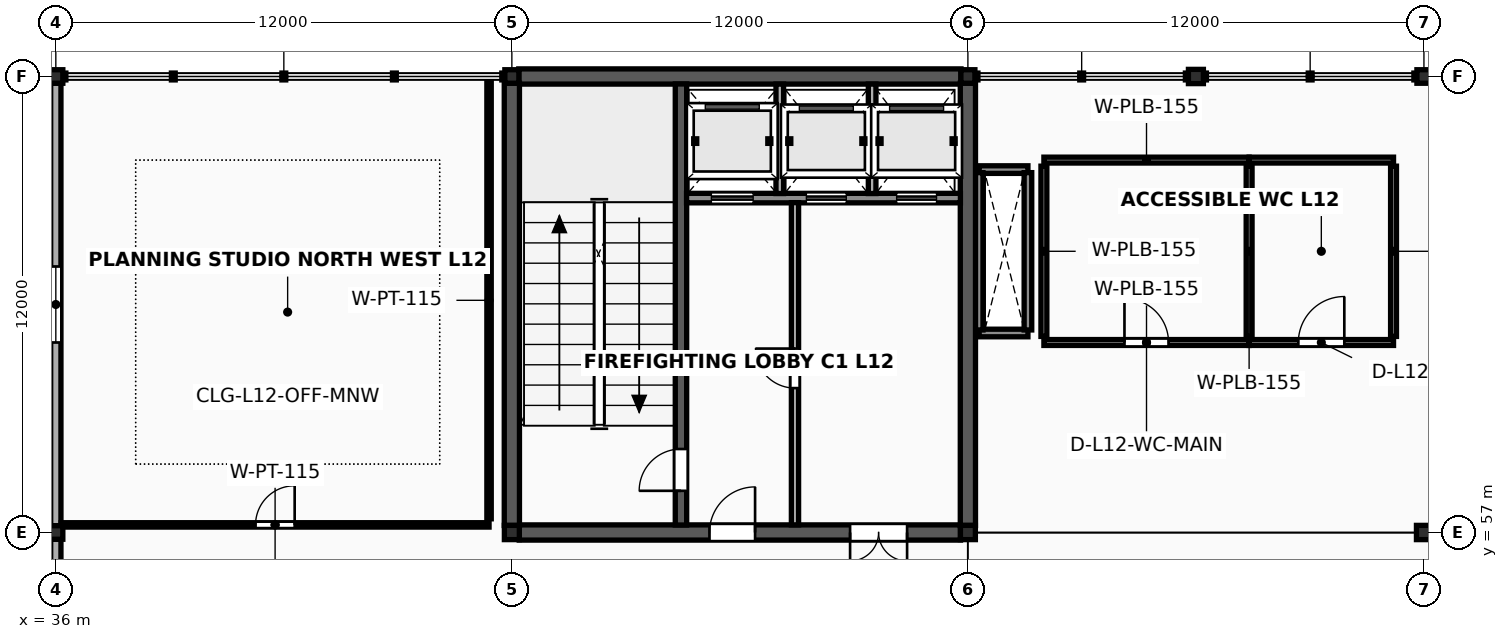
"""IFC4 building model, lengths in metres.
Left out: names, types, materials, properties, quantities, classifications, styles, units other than length and angle.
Written with IfcOpenShell. Run it as: python <this file> out.ifc"""

import sys

from ifc_helpers import new_model, si_unit, direction, frame, frame_2d, origin, origin_2d, place, context, subcontext, project, spatial, rectangle, i_section, extrude, element, fill, save


model = new_model("IFC4")
c1 = context("Model", 3, precision=1e-05, world=origin(), true_north=direction((0.0, 1.0)))
c2 = subcontext(c1, "Body", "Model", "MODEL_VIEW")
j1 = project(units=[si_unit("LENGTHUNIT", "METRE"), si_unit("PLANEANGLEUNIT", "RADIAN")], contexts=[c1])
p1 = place(None, origin())
s1 = spatial("IfcSite", under=j1, at=p1, CompositionType="ELEMENT")
p2 = place(p1, origin())
s2 = spatial("IfcBuilding", under=s1, at=p2, CompositionType="ELEMENT")
p3 = place(p2, frame((0.0, 0.0, 49.6)))
s3 = spatial("IfcBuildingStorey", under=s2, at=p3, CompositionType="ELEMENT", Elevation=49.6)
for number, where, z_axis, x_axis in (
    (1, (36.0, 57.0, 0.0), (0.0, 0.0, 1.0), (1.0, 0.0, 0.0)),
    (2, (36.0, 69.0, 0.0), (0.0, 0.0, 1.0), (1.0, 0.0, 0.0)),
):
    element("IfcColumn", number, at=place(p3, frame(where, z_axis=z_axis, x_axis=x_axis)), inside=s3, PredefinedType="COLUMN", context=c2, shape_type="SweptSolid", body=[
        extrude(i_section(OverallWidth=0.369, OverallDepth=0.356, WebThickness=0.011, FlangeThickness=0.018, FilletRadius=0.018, at=origin_2d()), origin(), (0.0, 0.0, 1.0), 4.0),
    ])
p4 = place(p3, frame((48.0, 57.0, 0.0), z_axis=(0.0, 0.0, 1.0), x_axis=(1.0, 0.0, 0.0)))
e3 = element("IfcColumn", 3, at=p4, inside=s3, PredefinedType="COLUMN", context=c2, shape_type="SweptSolid", body=[
    extrude(i_section(OverallWidth=0.394, OverallDepth=0.375, WebThickness=0.017, FlangeThickness=0.028, FilletRadius=0.018, at=origin_2d()), origin(), (0.0, 0.0, 1.0), 4.0),
])
p5 = place(p3, frame((48.0, 69.0, 0.0), z_axis=(0.0, 0.0, 1.0), x_axis=(1.0, 0.0, 0.0)))
e4 = element("IfcColumn", 4, at=p5, inside=s3, PredefinedType="COLUMN", context=c2, shape_type="SweptSolid", body=[
    extrude(i_section(OverallWidth=0.369, OverallDepth=0.356, WebThickness=0.011, FlangeThickness=0.018, FilletRadius=0.018, at=origin_2d()), origin(), (0.0, 0.0, 1.0), 4.0),
])
p6 = place(p3, frame((60.0, 57.0, 0.0), z_axis=(0.0, 0.0, 1.0), x_axis=(1.0, 0.0, 0.0)))
e5 = element("IfcColumn", 5, at=p6, inside=s3, PredefinedType="COLUMN", context=c2, shape_type="SweptSolid", body=[
    extrude(i_section(OverallWidth=0.394, OverallDepth=0.375, WebThickness=0.017, FlangeThickness=0.028, FilletRadius=0.018, at=origin_2d()), origin(), (0.0, 0.0, 1.0), 4.0),
])
p7 = place(p3, frame((60.0, 69.0, 0.0), z_axis=(0.0, 0.0, 1.0), x_axis=(1.0, 0.0, 0.0)))
e6 = element("IfcColumn", 6, at=p7, inside=s3, PredefinedType="COLUMN", context=c2, shape_type="SweptSolid", body=[
    extrude(i_section(OverallWidth=0.369, OverallDepth=0.356, WebThickness=0.011, FlangeThickness=0.018, FilletRadius=0.018, at=origin_2d()), origin(), (0.0, 0.0, 1.0), 4.0),
])
p8 = place(p3, frame((72.0, 57.0, 0.0), z_axis=(0.0, 0.0, 1.0), x_axis=(1.0, 0.0, 0.0)))
e7 = element("IfcColumn", 7, at=p8, inside=s3, PredefinedType="COLUMN", context=c2, shape_type="SweptSolid", body=[
    extrude(i_section(OverallWidth=0.394, OverallDepth=0.375, WebThickness=0.017, FlangeThickness=0.028, FilletRadius=0.018, at=origin_2d()), origin(), (0.0, 0.0, 1.0), 4.0),
])
p9 = place(p3, frame((72.0, 69.0, 0.0), z_axis=(0.0, 0.0, 1.0), x_axis=(1.0, 0.0, 0.0)))
e8 = element("IfcColumn", 8, at=p9, inside=s3, PredefinedType="COLUMN", context=c2, shape_type="SweptSolid", body=[
    extrude(i_section(OverallWidth=0.369, OverallDepth=0.356, WebThickness=0.011, FlangeThickness=0.018, FilletRadius=0.018, at=origin_2d()), origin(), (0.0, 0.0, 1.0), 4.0),
])
p10 = place(p3, frame((66.0, 69.0, 0.0), z_axis=(0.0, 0.0, 1.0), x_axis=(1.0, 0.0, 0.0)))
e9 = element("IfcColumn", 9, at=p10, inside=s3, PredefinedType="COLUMN", context=c2, shape_type="SweptSolid", body=[
    extrude(i_section(OverallWidth=0.394, OverallDepth=0.375, WebThickness=0.017, FlangeThickness=0.028, FilletRadius=0.018, at=origin_2d()), origin(), (0.0, 0.0, 1.0), 4.0),
])
for number, where, z_axis, x_axis in (
    (10, (60.297, 62.25, 0.0), (0.0, 0.0, 1.0), (1.0, 0.0, 0.0)),
    (11, (60.297, 66.55, 0.0), (0.0, 0.0, 1.0), (1.0, 0.0, 0.0)),
):
    element("IfcWall", number, at=place(p3, frame(where, z_axis=z_axis, x_axis=x_axis)), inside=s3, PredefinedType="SOLIDWALL", context=c2, shape_type="SweptSolid", body=[
        extrude(rectangle(XDim=1.283, YDim=0.2, at=frame_2d((0.642, 0.0))), origin(), (0.0, 0.0, 1.0), 3.848),
    ])
for number, where, z_axis, x_axis in (
    (12, (60.297, 62.33, 0.0), (0.0, 0.0, 1.0), (0.0, 1.0, 0.0)),
    (13, (61.58, 62.33, 0.0), (0.0, 0.0, 1.0), (0.0, 1.0, 0.0)),
):
    element("IfcWall", number, at=place(p3, frame(where, z_axis=z_axis, x_axis=x_axis)), inside=s3, PredefinedType="SOLIDWALL", context=c2, shape_type="SweptSolid", body=[
        extrude(rectangle(XDim=4.14, YDim=0.2, at=frame_2d((2.07, 0.0))), origin(), (0.0, 0.0, 1.0), 3.848),
    ])
p11 = place(p3, frame((48.194, 57.0, 0.0), z_axis=(0.0, 0.0, 1.0), x_axis=(1.0, 0.0, 0.0)))
e14 = element("IfcWall", 14, at=p11, inside=s3, PredefinedType="SHEAR", context=c2, shape_type="SweptSolid", body=[
    extrude(rectangle(XDim=11.612, YDim=0.4, at=frame_2d((5.806, 0.0))), origin(), (0.0, 0.0, 1.0), 3.848),
])
p12 = place(p11, frame((5.006, 0.0, 0.0)))
e15 = element("IfcOpeningElement", 15, at=p12, cuts=e14, PredefinedType="OPENING", context=c2, shape_type="SweptSolid", body=[
    extrude(rectangle(XDim=1.2, YDim=2.2, at=frame_2d((0.6, 1.1))), frame((0.0, 0.215, 0.0), z_axis=(0.0, -1.0, 0.0), x_axis=(1.0, 0.0, 0.0)), (0.0, 0.0, 1.0), 0.43),
])
p13 = place(p11, frame((8.706, 0.0, 0.0)))
e16 = element("IfcOpeningElement", 16, at=p13, cuts=e14, PredefinedType="OPENING", context=c2, shape_type="SweptSolid", body=[
    extrude(rectangle(XDim=1.5, YDim=2.25, at=frame_2d((0.75, 1.125))), frame((0.0, 0.215, 0.0), z_axis=(0.0, -1.0, 0.0), x_axis=(1.0, 0.0, 0.0)), (0.0, 0.0, 1.0), 0.43),
])
p14 = place(p3, frame((48.181, 69.0, 0.0), z_axis=(0.0, 0.0, 1.0), x_axis=(1.0, 0.0, 0.0)))
e17 = element("IfcWall", 17, at=p14, inside=s3, PredefinedType="SHEAR", context=c2, shape_type="SweptSolid", body=[
    extrude(rectangle(XDim=11.637, YDim=0.4, at=frame_2d((5.819, 0.0))), origin(), (0.0, 0.0, 1.0), 3.848),
])
for number, where, z_axis, x_axis in (
    (18, (48.0, 57.185, 0.0), (0.0, 0.0, 1.0), (0.0, 1.0, 0.0)),
    (19, (60.0, 57.185, 0.0), (0.0, 0.0, 1.0), (0.0, 1.0, 0.0)),
):
    element("IfcWall", number, at=place(p3, frame(where, z_axis=z_axis, x_axis=x_axis)), inside=s3, PredefinedType="SHEAR", context=c2, shape_type="SweptSolid", body=[
        extrude(rectangle(XDim=11.64, YDim=0.4, at=frame_2d((5.82, 0.0))), origin(), (0.0, 0.0, 1.0), 3.848),
    ])
p15 = place(p3, frame((52.45, 57.197, 0.0), z_axis=(0.0, 0.0, 1.0), x_axis=(0.0, 1.0, 0.0)))
e20 = element("IfcWall", 20, at=p15, inside=s3, PredefinedType="SHEAR", context=c2, shape_type="SweptSolid", body=[
    extrude(rectangle(XDim=11.606, YDim=0.3, at=frame_2d((5.803, 0.0))), origin(), (0.0, 0.0, 1.0), 3.848),
])
p16 = place(p15, frame((0.9, 0.0, 0.0)))
e21 = element("IfcOpeningElement", 21, at=p16, cuts=e20, PredefinedType="OPENING", context=c2, shape_type="SweptSolid", body=[
    extrude(rectangle(XDim=1.1, YDim=2.2, at=frame_2d((0.55, 1.1))), frame((0.0, 0.165, 0.0), z_axis=(0.0, -1.0, 0.0), x_axis=(1.0, 0.0, 0.0)), (0.0, 0.0, 1.0), 0.33),
])
p17 = place(p3, frame((52.597, 65.8, 0.0), z_axis=(0.0, 0.0, 1.0), x_axis=(1.0, 0.0, 0.0)))
e22 = element("IfcWall", 22, at=p17, inside=s3, PredefinedType="SOLIDWALL", context=c2, shape_type="SweptSolid", body=[
    extrude(rectangle(XDim=7.206, YDim=0.25, at=frame_2d((3.603, 0.0))), origin(), (0.0, 0.0, 1.0), 3.848),
])
p18 = place(p17, frame((0.653, 0.0, 0.0)))
e23 = element("IfcOpeningElement", 23, at=p18, cuts=e22, PredefinedType="OPENING", context=c2, shape_type="SweptSolid", body=[
    extrude(rectangle(XDim=1.1, YDim=2.24, at=frame_2d((0.55, 1.12))), frame((0.0, 0.14, 0.0), z_axis=(0.0, -1.0, 0.0), x_axis=(1.0, 0.0, 0.0)), (0.0, 0.0, 1.0), 0.28),
])
p19 = place(p17, frame((3.153, 0.0, 0.0)))
e24 = element("IfcOpeningElement", 24, at=p19, cuts=e22, PredefinedType="OPENING", context=c2, shape_type="SweptSolid", body=[
    extrude(rectangle(XDim=1.05, YDim=2.2, at=frame_2d((0.525, 1.1))), frame((0.0, 0.14, 0.0), z_axis=(0.0, -1.0, 0.0), x_axis=(1.0, 0.0, 0.0)), (0.0, 0.0, 1.0), 0.28),
])
p20 = place(p17, frame((5.528, 0.0, 0.0)))
e25 = element("IfcOpeningElement", 25, at=p20, cuts=e22, PredefinedType="OPENING", context=c2, shape_type="SweptSolid", body=[
    extrude(rectangle(XDim=1.05, YDim=2.2, at=frame_2d((0.525, 1.1))), frame((0.0, 0.14, 0.0), z_axis=(0.0, -1.0, 0.0), x_axis=(1.0, 0.0, 0.0)), (0.0, 0.0, 1.0), 0.28),
])
for number, where, z_axis, x_axis in (
    (26, (55.05, 65.92, 0.0), (0.0, 0.0, 1.0), (0.0, 1.0, 0.0)),
    (27, (57.48, 65.92, 0.0), (0.0, 0.0, 1.0), (0.0, 1.0, 0.0)),
):
    element("IfcWall", number, at=place(p3, frame(where, z_axis=z_axis, x_axis=x_axis)), inside=s3, PredefinedType="SOLIDWALL", context=c2, shape_type="SweptSolid", body=[
        extrude(rectangle(XDim=2.88, YDim=0.2, at=frame_2d((1.44, 0.0))), origin(), (0.0, 0.0, 1.0), 3.838),
    ])
p21 = place(p3, frame((55.45, 57.2, 0.0), z_axis=(0.0, 0.0, 1.0), x_axis=(0.0, 1.0, 0.0)))
e28 = element("IfcWall", 28, at=p21, inside=s3, PredefinedType="SOLIDWALL", context=c2, shape_type="SweptSolid", body=[
    extrude(rectangle(XDim=8.48, YDim=0.19, at=frame_2d((4.24, 0.0))), origin(), (0.0, 0.0, 1.0), 3.838),
])
p22 = place(p21, frame((3.6, 0.0, 0.0)))
e29 = element("IfcOpeningElement", 29, at=p22, cuts=e28, PredefinedType="OPENING", context=c2, shape_type="SweptSolid", body=[
    extrude(rectangle(XDim=1.04, YDim=2.18, at=frame_2d((0.52, 1.09))), frame((0.0, 0.11, 0.0), z_axis=(0.0, -1.0, 0.0), x_axis=(1.0, 0.0, 0.0)), (0.0, 0.0, 1.0), 0.22),
])
p23 = place(p3, frame((36.0, 45.176, 0.0), z_axis=(0.0, 0.0, 1.0), x_axis=(0.0, 1.0, 0.0)))
e30 = element("IfcWall", 30, at=p23, inside=s3, PredefinedType="SOLIDWALL", context=c2, shape_type="SweptSolid", body=[
    extrude(rectangle(XDim=11.648, YDim=0.27, at=frame_2d((5.824, 0.0))), origin(), (0.0, 0.0, 1.0), 3.301),
])
p24 = place(p23, frame((4.904, 0.0, 0.78)))
e31 = element("IfcOpeningElement", 31, at=p24, cuts=e30, PredefinedType="OPENING", context=c2, shape_type="SweptSolid", body=[
    extrude(rectangle(XDim=1.84, YDim=1.42, at=frame_2d((0.92, 0.71))), frame((0.0, 0.15, 0.0), z_axis=(0.0, -1.0, 0.0), x_axis=(1.0, 0.0, 0.0)), (0.0, 0.0, 1.0), 0.3),
])
p25 = place(p3, frame((36.0, 57.176, 0.0), z_axis=(0.0, 0.0, 1.0), x_axis=(0.0, 1.0, 0.0)))
e32 = element("IfcWall", 32, at=p25, inside=s3, PredefinedType="SOLIDWALL", context=c2, shape_type="SweptSolid", body=[
    extrude(rectangle(XDim=11.648, YDim=0.27, at=frame_2d((5.824, 0.0))), origin(), (0.0, 0.0, 1.0), 3.301),
])
p26 = place(p25, frame((4.824, 0.0, 0.78)))
e33 = element("IfcOpeningElement", 33, at=p26, cuts=e32, PredefinedType="OPENING", context=c2, shape_type="SweptSolid", body=[
    extrude(rectangle(XDim=2.0, YDim=1.42, at=frame_2d((1.0, 0.71))), frame((0.0, 0.15, 0.0), z_axis=(0.0, -1.0, 0.0), x_axis=(1.0, 0.0, 0.0)), (0.0, 0.0, 1.0), 0.3),
])
p27 = place(p3, frame((62.0, 62.0, 0.0), z_axis=(0.0, 0.0, 1.0), x_axis=(1.0, 0.0, 0.0)))
e34 = element("IfcWall", 34, at=p27, inside=s3, PredefinedType="PLUMBINGWALL", context=c2, shape_type="SweptSolid", body=[
    extrude(rectangle(XDim=5.4, YDim=0.155, at=frame_2d((2.7, 0.0))), origin(), (0.0, 0.0, 1.0), 2.88),
])
p28 = place(p27, frame((2.12, 0.0, 0.0)))
e35 = element("IfcOpeningElement", 35, at=p28, cuts=e34, PredefinedType="OPENING", context=c2, shape_type="SweptSolid", body=[
    extrude(rectangle(XDim=1.16, YDim=2.23, at=frame_2d((0.58, 1.115))), frame((0.0, 0.093, 0.0), z_axis=(0.0, -1.0, 0.0), x_axis=(1.0, 0.0, 0.0)), (0.0, 0.0, 1.0), 0.185),
])
p29 = place(p3, frame((62.0, 66.8, 0.0), z_axis=(0.0, 0.0, 1.0), x_axis=(1.0, 0.0, 0.0)))
e36 = element("IfcWall", 36, at=p29, inside=s3, PredefinedType="PLUMBINGWALL", context=c2, shape_type="SweptSolid", body=[
    extrude(rectangle(XDim=5.4, YDim=0.155, at=frame_2d((2.7, 0.0))), origin(), (0.0, 0.0, 1.0), 2.88),
])
for number, where, z_axis, x_axis in (
    (37, (62.0, 62.16, 0.0), (0.0, 0.0, 1.0), (0.0, 1.0, 0.0)),
    (38, (67.4, 62.16, 0.0), (0.0, 0.0, 1.0), (0.0, 1.0, 0.0)),
):
    element("IfcWall", number, at=place(p3, frame(where, z_axis=z_axis, x_axis=x_axis)), inside=s3, PredefinedType="PLUMBINGWALL", context=c2, shape_type="SweptSolid", body=[
        extrude(rectangle(XDim=4.48, YDim=0.155, at=frame_2d((2.24, 0.0))), origin(), (0.0, 0.0, 1.0), 2.88),
    ])
p30 = place(p3, frame((67.4, 62.0, 0.0), z_axis=(0.0, 0.0, 1.0), x_axis=(1.0, 0.0, 0.0)))
e39 = element("IfcWall", 39, at=p30, inside=s3, PredefinedType="PLUMBINGWALL", context=c2, shape_type="SweptSolid", body=[
    extrude(rectangle(XDim=3.8, YDim=0.155, at=frame_2d((1.9, 0.0))), origin(), (0.0, 0.0, 1.0), 2.88),
])
p31 = place(p30, frame((1.295, 0.0, 0.0)))
e40 = element("IfcOpeningElement", 40, at=p31, cuts=e39, PredefinedType="OPENING", context=c2, shape_type="SweptSolid", body=[
    extrude(rectangle(XDim=1.21, YDim=2.25, at=frame_2d((0.605, 1.125))), frame((0.0, 0.093, 0.0), z_axis=(0.0, -1.0, 0.0), x_axis=(1.0, 0.0, 0.0)), (0.0, 0.0, 1.0), 0.185),
])
p32 = place(p3, frame((67.4, 66.8, 0.0), z_axis=(0.0, 0.0, 1.0), x_axis=(1.0, 0.0, 0.0)))
e41 = element("IfcWall", 41, at=p32, inside=s3, PredefinedType="PLUMBINGWALL", context=c2, shape_type="SweptSolid", body=[
    extrude(rectangle(XDim=3.8, YDim=0.155, at=frame_2d((1.9, 0.0))), origin(), (0.0, 0.0, 1.0), 2.88),
])
p33 = place(p3, frame((71.2, 62.16, 0.0), z_axis=(0.0, 0.0, 1.0), x_axis=(0.0, 1.0, 0.0)))
e42 = element("IfcWall", 42, at=p33, inside=s3, PredefinedType="PLUMBINGWALL", context=c2, shape_type="SweptSolid", body=[
    extrude(rectangle(XDim=4.48, YDim=0.155, at=frame_2d((2.24, 0.0))), origin(), (0.0, 0.0, 1.0), 2.88),
])
p34 = place(p3, frame((36.14, 57.2, 0.0), z_axis=(0.0, 0.0, 1.0), x_axis=(1.0, 0.0, 0.0)))
e43 = element("IfcWall", 43, at=p34, inside=s3, PredefinedType="PARTITIONING", context=c2, shape_type="SweptSolid", body=[
    extrude(rectangle(XDim=11.26, YDim=0.115, at=frame_2d((5.63, 0.0))), origin(), (0.0, 0.0, 1.0), 2.88),
])
p35 = place(p34, frame((5.115, 0.0, 0.0)))
e44 = element("IfcOpeningElement", 44, at=p35, cuts=e43, PredefinedType="OPENING", context=c2, shape_type="SweptSolid", body=[
    extrude(rectangle(XDim=1.03, YDim=2.17, at=frame_2d((0.515, 1.085))), frame((0.0, 0.073, 0.0), z_axis=(0.0, -1.0, 0.0), x_axis=(1.0, 0.0, 0.0)), (0.0, 0.0, 1.0), 0.145),
])
p36 = place(p3, frame((47.4, 57.36, 0.0), z_axis=(0.0, 0.0, 1.0), x_axis=(0.0, 1.0, 0.0)))
e45 = element("IfcWall", 45, at=p36, inside=s3, PredefinedType="PARTITIONING", context=c2, shape_type="SweptSolid", body=[
    extrude(rectangle(XDim=11.5, YDim=0.115, at=frame_2d((5.75, 0.0))), origin(), (0.0, 0.0, 1.0), 2.88),
])
p37 = place(p26, origin())
e46 = element("IfcWindow", 46, at=p37, inside=s3, PartitioningType="DOUBLE_PANEL_VERTICAL", PredefinedType="WINDOW", context=c2, shape_type="SweptSolid", body=[
    extrude(rectangle(XDim=2.0, YDim=1.42, at=frame_2d((1.0, 0.71))), frame((0.0, 0.03, 0.0), z_axis=(0.0, -1.0, 0.0), x_axis=(1.0, 0.0, 0.0)), (0.0, 0.0, 1.0), 0.06),
])
fill(e33, e46)
p38 = place(p16, origin())
e47 = element("IfcDoor", 47, at=p38, inside=s3, OperationType="SINGLE_SWING_LEFT", PredefinedType="DOOR", context=c2, shape_type="SweptSolid", body=[
    extrude(rectangle(XDim=1.1, YDim=2.2, at=frame_2d((0.55, 1.1))), frame((0.0, 0.025, 0.0), z_axis=(0.0, -1.0, 0.0), x_axis=(1.0, 0.0, 0.0)), (0.0, 0.0, 1.0), 0.05),
])
fill(e21, e47)
p39 = place(p22, origin())
e48 = element("IfcDoor", 48, at=p39, inside=s3, OperationType="SINGLE_SWING_RIGHT", PredefinedType="DOOR", context=c2, shape_type="SweptSolid", body=[
    extrude(rectangle(XDim=1.04, YDim=2.18, at=frame_2d((0.52, 1.09))), frame((0.0, 0.025, 0.0), z_axis=(0.0, -1.0, 0.0), x_axis=(1.0, 0.0, 0.0)), (0.0, 0.0, 1.0), 0.05),
])
fill(e29, e48)
p40 = place(p12, origin())
e49 = element("IfcDoor", 49, at=p40, inside=s3, OperationType="SINGLE_SWING_RIGHT", PredefinedType="DOOR", context=c2, shape_type="SweptSolid", body=[
    extrude(rectangle(XDim=1.2, YDim=2.2, at=frame_2d((0.6, 1.1))), frame((0.0, 0.025, 0.0), z_axis=(0.0, -1.0, 0.0), x_axis=(1.0, 0.0, 0.0)), (0.0, 0.0, 1.0), 0.05),
])
fill(e15, e49)
p41 = place(p13, origin())
e50 = element("IfcDoor", 50, at=p41, inside=s3, OperationType="DOUBLE_DOOR_SINGLE_SWING", PredefinedType="DOOR", context=c2, shape_type="SweptSolid", body=[
    extrude(rectangle(XDim=1.5, YDim=2.25, at=frame_2d((0.75, 1.125))), frame((0.0, 0.025, 0.0), z_axis=(0.0, -1.0, 0.0), x_axis=(1.0, 0.0, 0.0)), (0.0, 0.0, 1.0), 0.05),
])
fill(e16, e50)
p42 = place(p18, origin())
e51 = element("IfcDoor", 51, at=p42, inside=s3, OperationType="SLIDING_TO_LEFT", PredefinedType="USERDEFINED", context=c2, shape_type="SweptSolid", body=[
    extrude(rectangle(XDim=1.1, YDim=2.24, at=frame_2d((0.55, 1.12))), frame((0.0, 0.025, 0.0), z_axis=(0.0, -1.0, 0.0), x_axis=(1.0, 0.0, 0.0)), (0.0, 0.0, 1.0), 0.05),
])
fill(e23, e51)
p43 = place(p19, origin())
e52 = element("IfcDoor", 52, at=p43, inside=s3, OperationType="SLIDING_TO_LEFT", PredefinedType="USERDEFINED", context=c2, shape_type="SweptSolid", body=[
    extrude(rectangle(XDim=1.05, YDim=2.2, at=frame_2d((0.525, 1.1))), frame((0.0, 0.025, 0.0), z_axis=(0.0, -1.0, 0.0), x_axis=(1.0, 0.0, 0.0)), (0.0, 0.0, 1.0), 0.05),
])
fill(e24, e52)
p44 = place(p20, origin())
e53 = element("IfcDoor", 53, at=p44, inside=s3, OperationType="SLIDING_TO_LEFT", PredefinedType="USERDEFINED", context=c2, shape_type="SweptSolid", body=[
    extrude(rectangle(XDim=1.05, YDim=2.2, at=frame_2d((0.525, 1.1))), frame((0.0, 0.025, 0.0), z_axis=(0.0, -1.0, 0.0), x_axis=(1.0, 0.0, 0.0)), (0.0, 0.0, 1.0), 0.05),
])
fill(e25, e53)
p45 = place(p28, origin())
e54 = element("IfcDoor", 54, at=p45, inside=s3, OperationType="SINGLE_SWING_LEFT", PredefinedType="DOOR", context=c2, shape_type="SweptSolid", body=[
    extrude(rectangle(XDim=1.16, YDim=2.23, at=frame_2d((0.58, 1.115))), frame((0.0, 0.025, 0.0), z_axis=(0.0, -1.0, 0.0), x_axis=(1.0, 0.0, 0.0)), (0.0, 0.0, 1.0), 0.05),
])
fill(e35, e54)
p46 = place(p31, origin())
e55 = element("IfcDoor", 55, at=p46, inside=s3, OperationType="SINGLE_SWING_RIGHT", PredefinedType="DOOR", context=c2, shape_type="SweptSolid", body=[
    extrude(rectangle(XDim=1.21, YDim=2.25, at=frame_2d((0.605, 1.125))), frame((0.0, 0.025, 0.0), z_axis=(0.0, -1.0, 0.0), x_axis=(1.0, 0.0, 0.0)), (0.0, 0.0, 1.0), 0.05),
])
fill(e40, e55)
p47 = place(p35, origin())
e56 = element("IfcDoor", 56, at=p47, inside=s3, OperationType="SINGLE_SWING_RIGHT", PredefinedType="DOOR", context=c2, shape_type="SweptSolid", body=[
    extrude(rectangle(XDim=1.03, YDim=2.17, at=frame_2d((0.515, 1.085))), frame((0.0, 0.025, 0.0), z_axis=(0.0, -1.0, 0.0), x_axis=(1.0, 0.0, 0.0)), (0.0, 0.0, 1.0), 0.05),
])
fill(e44, e56)
save(model, sys.argv[1])
